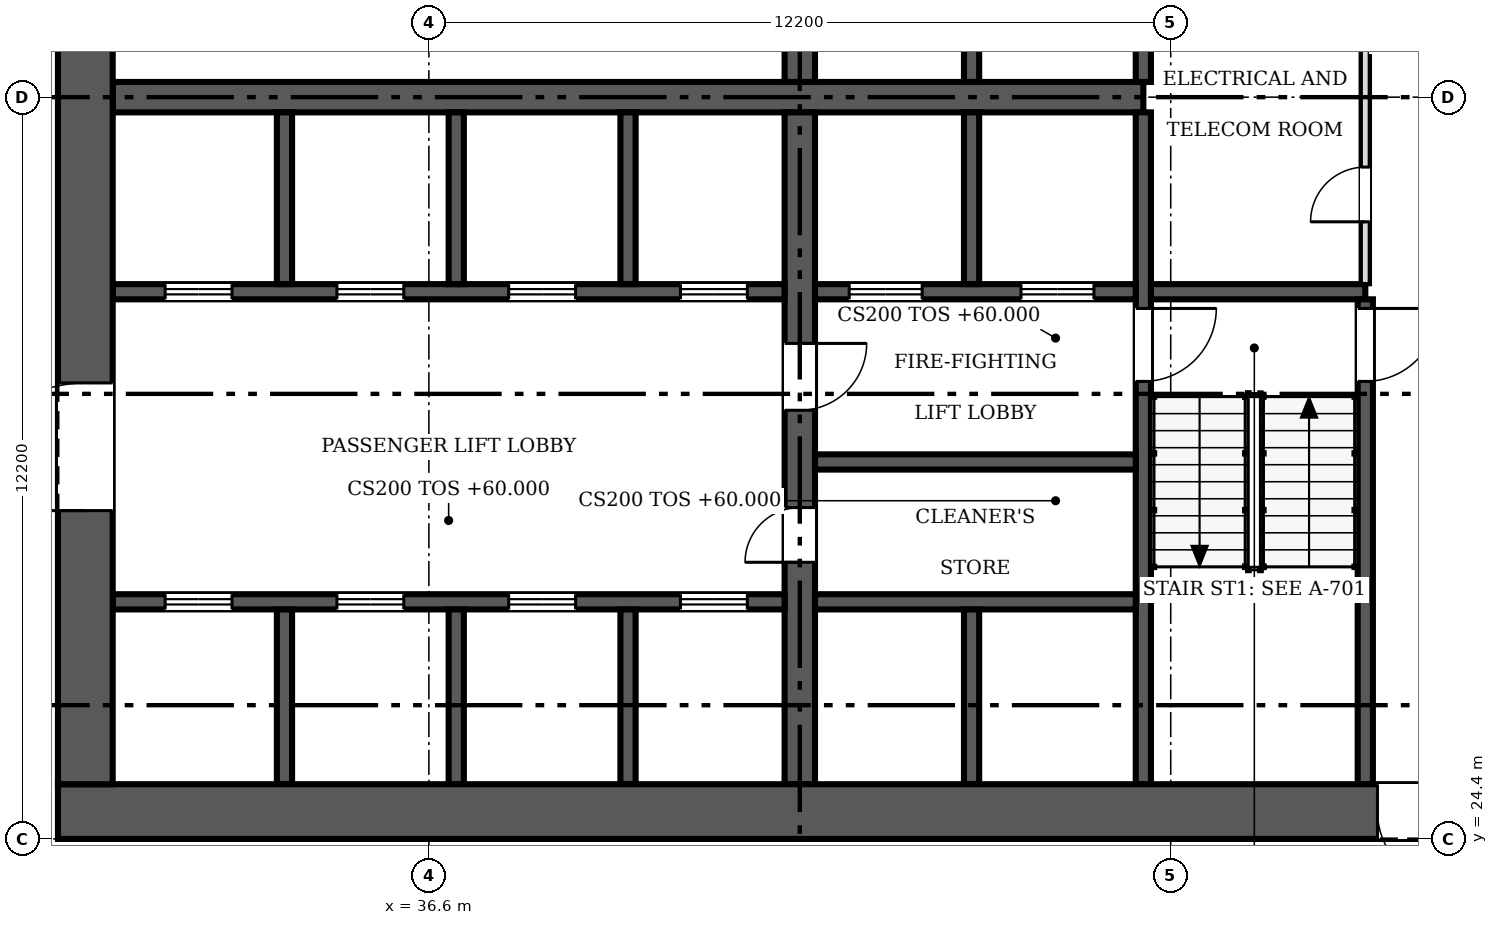
"""IFC4 building model, lengths in metres.
Left out: names, types, materials, properties, quantities, classifications, styles, units other than length and angle.
Written with IfcOpenShell. Run it as: python <this file> out.ifc"""

import sys

from ifc_helpers import new_model, si_unit, direction, frame, frame_2d, origin, place, context, subcontext, project, spatial, rectangle, extrude, source, transform, mapped, element, fill, save


model = new_model("IFC4")
c1 = context("Model", 3, precision=1e-05, world=origin(), true_north=direction((0.0, 1.0)))
c2 = subcontext(c1, "Body", "Model", "MODEL_VIEW")
j1 = project(units=[si_unit("LENGTHUNIT", "METRE"), si_unit("PLANEANGLEUNIT", "RADIAN")], contexts=[c1])
p1 = place(None, origin())
s1 = spatial("IfcSite", under=j1, at=p1, CompositionType="ELEMENT")
p2 = place(p1, origin())
s2 = spatial("IfcBuilding", under=s1, at=p2, CompositionType="ELEMENT")
p3 = place(p2, frame((0.0, 0.0, 60.0)))
s3 = spatial("IfcBuildingStorey", under=s2, at=p3, CompositionType="ELEMENT", Elevation=60.0)
p4 = place(p3, frame((54.9, 24.85, 0.0), z_axis=(0.0, 0.0, 1.0), x_axis=(-1.0, 0.0, 0.0)))
e1 = element("IfcWall", 1, at=p4, inside=s3, PredefinedType="SHEAR", context=c2, shape_type="SweptSolid", body=[
    extrude(rectangle(XDim=24.4, YDim=0.9, at=frame_2d((12.2, 0.0))), origin(), (0.0, 0.0, 1.0), 3.8),
])
m1 = source(origin(), c2, "Body", "SweptSolid", [
    extrude(rectangle(XDim=1.2, YDim=2.1, at=frame_2d((0.6, 1.05))), frame((0.0, 0.46, 0.0), z_axis=(0.0, -1.0, 0.0), x_axis=(1.0, 0.0, 0.0)), (0.0, 0.0, 1.0), 0.92),
])
p5 = place(p4, frame((1.5, 0.0, 0.0)))
e2 = element("IfcOpeningElement", 2, at=p5, cuts=e1, PredefinedType="OPENING", context=c2, shape_type="MappedRepresentation", body=[
    mapped(m1, transform((0.0, 0.0, 0.0), scale=1.0)),
])
p6 = place(p3, frame((30.95, 25.3, 0.0), z_axis=(0.0, 0.0, 1.0), x_axis=(0.0, 1.0, 0.0)))
e3 = element("IfcWall", 3, at=p6, inside=s3, PredefinedType="SHEAR", context=c2, shape_type="SweptSolid", body=[
    extrude(rectangle(XDim=22.6, YDim=0.9, at=frame_2d((11.3, 0.0))), origin(), (0.0, 0.0, 1.0), 3.8),
])
m2 = source(origin(), c2, "Body", "SweptSolid", [
    extrude(rectangle(XDim=2.1, YDim=2.4, at=frame_2d((1.05, 1.2))), frame((0.0, 0.46, 0.0), z_axis=(0.0, -1.0, 0.0), x_axis=(1.0, 0.0, 0.0)), (0.0, 0.0, 1.0), 0.92),
])
p7 = place(p6, frame((4.5, 0.0, 0.0)))
e4 = element("IfcOpeningElement", 4, at=p7, cuts=e3, PredefinedType="OPENING", context=c2, shape_type="MappedRepresentation", body=[
    mapped(m2, transform((0.0, 0.0, 0.0), scale=1.0)),
])
p8 = place(p6, frame((16.0, 0.0, 0.0)))
e5 = element("IfcOpeningElement", 5, at=p8, cuts=e3, PredefinedType="OPENING", context=c2, shape_type="MappedRepresentation", body=[
    mapped(m2, transform((0.0, 0.0, 0.0), scale=1.0)),
])
p9 = place(p3, frame((31.4, 36.6, 0.0), z_axis=(0.0, 0.0, 1.0), x_axis=(1.0, 0.0, 0.0)))
e6 = element("IfcWall", 6, at=p9, inside=s3, PredefinedType="SHEAR", context=c2, shape_type="SweptSolid", body=[
    extrude(rectangle(XDim=16.95, YDim=0.5, at=frame_2d((8.475, 0.0))), origin(), (0.0, 0.0, 1.0), 3.8),
])
p10 = place(p3, frame((42.7, 36.35, 0.0), z_axis=(0.0, 0.0, 1.0), x_axis=(0.0, -1.0, 0.0)))
e7 = element("IfcWall", 7, at=p10, inside=s3, PredefinedType="SHEAR", context=c2, shape_type="SweptSolid", body=[
    extrude(rectangle(XDim=11.05, YDim=0.5, at=frame_2d((5.525, 0.0))), origin(), (0.0, 0.0, 1.0), 3.8),
])
m3 = source(origin(), c2, "Body", "SweptSolid", [
    extrude(rectangle(XDim=0.9, YDim=2.1, at=frame_2d((0.45, 1.05))), frame((0.0, 0.26, 0.0), z_axis=(0.0, -1.0, 0.0), x_axis=(1.0, 0.0, 0.0)), (0.0, 0.0, 1.0), 0.52),
])
p11 = place(p10, frame((6.5, 0.0, 0.0)))
e8 = element("IfcOpeningElement", 8, at=p11, cuts=e7, PredefinedType="OPENING", context=c2, shape_type="MappedRepresentation", body=[
    mapped(m3, transform((0.0, 0.0, 0.0), scale=1.0)),
])
m4 = source(origin(), c2, "Body", "SweptSolid", [
    extrude(rectangle(XDim=1.1, YDim=2.1, at=frame_2d((0.55, 1.05))), frame((0.0, 0.26, 0.0), z_axis=(0.0, -1.0, 0.0), x_axis=(1.0, 0.0, 0.0)), (0.0, 0.0, 1.0), 0.52),
])
p12 = place(p10, frame((3.8, 0.0, 0.0)))
e9 = element("IfcOpeningElement", 9, at=p12, cuts=e7, PredefinedType="OPENING", context=c2, shape_type="MappedRepresentation", body=[
    mapped(m4, transform((0.0, 0.0, 0.0), scale=1.0)),
])
p13 = place(p3, frame((42.7, 36.85, 0.0), z_axis=(0.0, 0.0, 1.0), x_axis=(0.0, 1.0, 0.0)))
e10 = element("IfcWall", 10, at=p13, inside=s3, PredefinedType="SHEAR", context=c2, shape_type="SweptSolid", body=[
    extrude(rectangle(XDim=2.95, YDim=0.5, at=frame_2d((1.475, 0.0))), origin(), (0.0, 0.0, 1.0), 3.8),
])
p14 = place(p3, frame((48.35, 36.35, 0.0), z_axis=(0.0, 0.0, 1.0), x_axis=(0.0, -1.0, 0.0)))
e11 = element("IfcWall", 11, at=p14, inside=s3, PredefinedType="SOLIDWALL", context=c2, shape_type="SweptSolid", body=[
    extrude(rectangle(XDim=11.05, YDim=0.25, at=frame_2d((5.525, 0.0))), origin(), (0.0, 0.0, 1.0), 3.8),
])
m5 = source(origin(), c2, "Body", "SweptSolid", [
    extrude(rectangle(XDim=1.2, YDim=2.1, at=frame_2d((0.6, 1.05))), frame((0.0, 0.135, 0.0), z_axis=(0.0, -1.0, 0.0), x_axis=(1.0, 0.0, 0.0)), (0.0, 0.0, 1.0), 0.27),
])
p15 = place(p14, frame((3.225, 0.0, 0.0)))
e12 = element("IfcOpeningElement", 12, at=p15, cuts=e11, PredefinedType="OPENING", context=c2, shape_type="MappedRepresentation", body=[
    mapped(m5, transform((0.0, 0.0, 0.0), scale=1.0)),
])
p16 = place(p3, frame((48.35, 47.9, 0.0), z_axis=(0.0, 0.0, 1.0), x_axis=(0.0, -1.0, 0.0)))
e13 = element("IfcWall", 13, at=p16, inside=s3, PredefinedType="SOLIDWALL", context=c2, shape_type="SweptSolid", body=[
    extrude(rectangle(XDim=11.05, YDim=0.25, at=frame_2d((5.525, 0.0))), origin(), (0.0, 0.0, 1.0), 3.8),
])
p17 = place(p16, frame((6.625, 0.0, 0.0)))
e14 = element("IfcOpeningElement", 14, at=p17, cuts=e13, PredefinedType="OPENING", context=c2, shape_type="MappedRepresentation", body=[
    mapped(m5, transform((0.0, 0.0, 0.0), scale=1.0)),
])
p18 = place(p3, frame((42.45, 33.4, 0.0), z_axis=(0.0, 0.0, 1.0), x_axis=(-1.0, 0.0, 0.0)))
e15 = element("IfcWall", 15, at=p18, inside=s3, PredefinedType="SOLIDWALL", context=c2, shape_type="SweptSolid", body=[
    extrude(rectangle(XDim=11.05, YDim=0.25, at=frame_2d((5.525, 0.0))), origin(), (0.0, 0.0, 1.0), 3.8),
])
m6 = source(origin(), c2, "Body", "SweptSolid", [
    extrude(rectangle(XDim=1.1, YDim=2.1, at=frame_2d((0.55, 1.05))), frame((0.0, 0.135, 0.0), z_axis=(0.0, -1.0, 0.0), x_axis=(1.0, 0.0, 0.0)), (0.0, 0.0, 1.0), 0.27),
])
p19 = place(p18, frame((9.087, 0.0, 0.0)))
e16 = element("IfcOpeningElement", 16, at=p19, cuts=e15, PredefinedType="OPENING", context=c2, shape_type="MappedRepresentation", body=[
    mapped(m6, transform((0.0, 0.0, 0.0), scale=1.0)),
])
p20 = place(p18, frame((6.262, 0.0, 0.0)))
e17 = element("IfcOpeningElement", 17, at=p20, cuts=e15, PredefinedType="OPENING", context=c2, shape_type="MappedRepresentation", body=[
    mapped(m6, transform((0.0, 0.0, 0.0), scale=1.0)),
])
p21 = place(p18, frame((3.438, 0.0, 0.0)))
e18 = element("IfcOpeningElement", 18, at=p21, cuts=e15, PredefinedType="OPENING", context=c2, shape_type="MappedRepresentation", body=[
    mapped(m6, transform((0.0, 0.0, 0.0), scale=1.0)),
])
p22 = place(p18, frame((0.613, 0.0, 0.0)))
e19 = element("IfcOpeningElement", 19, at=p22, cuts=e15, PredefinedType="OPENING", context=c2, shape_type="MappedRepresentation", body=[
    mapped(m6, transform((0.0, 0.0, 0.0), scale=1.0)),
])
p23 = place(p3, frame((48.225, 33.4, 0.0), z_axis=(0.0, 0.0, 1.0), x_axis=(-1.0, 0.0, 0.0)))
e20 = element("IfcWall", 20, at=p23, inside=s3, PredefinedType="SOLIDWALL", context=c2, shape_type="SweptSolid", body=[
    extrude(rectangle(XDim=5.275, YDim=0.25, at=frame_2d((2.638, 0.0))), origin(), (0.0, 0.0, 1.0), 3.8),
])
p24 = place(p23, frame((3.512, 0.0, 0.0)))
e21 = element("IfcOpeningElement", 21, at=p24, cuts=e20, PredefinedType="OPENING", context=c2, shape_type="MappedRepresentation", body=[
    mapped(m5, transform((0.0, 0.0, 0.0), scale=1.0)),
])
p25 = place(p23, frame((0.688, 0.0, 0.0)))
e22 = element("IfcOpeningElement", 22, at=p25, cuts=e20, PredefinedType="OPENING", context=c2, shape_type="MappedRepresentation", body=[
    mapped(m5, transform((0.0, 0.0, 0.0), scale=1.0)),
])
p26 = place(p3, frame((48.475, 33.4, 0.0), z_axis=(0.0, 0.0, 1.0), x_axis=(1.0, 0.0, 0.0)))
e23 = element("IfcWall", 23, at=p26, inside=s3, PredefinedType="SOLIDWALL", context=c2, shape_type="SweptSolid", body=[
    extrude(rectangle(XDim=3.525, YDim=0.25, at=frame_2d((1.762, 0.0))), origin(), (0.0, 0.0, 1.0), 3.8),
])
p27 = place(p3, frame((31.4, 28.3, 0.0), z_axis=(0.0, 0.0, 1.0), x_axis=(1.0, 0.0, 0.0)))
e24 = element("IfcWall", 24, at=p27, inside=s3, PredefinedType="SOLIDWALL", context=c2, shape_type="SweptSolid", body=[
    extrude(rectangle(XDim=11.05, YDim=0.25, at=frame_2d((5.525, 0.0))), origin(), (0.0, 0.0, 1.0), 3.8),
])
p28 = place(p27, frame((0.863, 0.0, 0.0)))
e25 = element("IfcOpeningElement", 25, at=p28, cuts=e24, PredefinedType="OPENING", context=c2, shape_type="MappedRepresentation", body=[
    mapped(m6, transform((0.0, 0.0, 0.0), scale=1.0)),
])
p29 = place(p27, frame((3.688, 0.0, 0.0)))
e26 = element("IfcOpeningElement", 26, at=p29, cuts=e24, PredefinedType="OPENING", context=c2, shape_type="MappedRepresentation", body=[
    mapped(m6, transform((0.0, 0.0, 0.0), scale=1.0)),
])
p30 = place(p27, frame((6.512, 0.0, 0.0)))
e27 = element("IfcOpeningElement", 27, at=p30, cuts=e24, PredefinedType="OPENING", context=c2, shape_type="MappedRepresentation", body=[
    mapped(m6, transform((0.0, 0.0, 0.0), scale=1.0)),
])
p31 = place(p27, frame((9.337, 0.0, 0.0)))
e28 = element("IfcOpeningElement", 28, at=p31, cuts=e24, PredefinedType="OPENING", context=c2, shape_type="MappedRepresentation", body=[
    mapped(m6, transform((0.0, 0.0, 0.0), scale=1.0)),
])
p32 = place(p3, frame((42.95, 28.3, 0.0), z_axis=(0.0, 0.0, 1.0), x_axis=(1.0, 0.0, 0.0)))
e29 = element("IfcWall", 29, at=p32, inside=s3, PredefinedType="SOLIDWALL", context=c2, shape_type="SweptSolid", body=[
    extrude(rectangle(XDim=5.275, YDim=0.25, at=frame_2d((2.638, 0.0))), origin(), (0.0, 0.0, 1.0), 3.8),
])
p33 = place(p3, frame((52.0, 25.3, 0.0), z_axis=(0.0, 0.0, 1.0), x_axis=(0.0, 1.0, 0.0)))
e30 = element("IfcWall", 30, at=p33, inside=s3, PredefinedType="SOLIDWALL", context=c2, shape_type="SweptSolid", body=[
    extrude(rectangle(XDim=7.975, YDim=0.25, at=frame_2d((3.987, 0.0))), origin(), (0.0, 0.0, 1.0), 3.8),
])
p34 = place(p33, frame((6.625, 0.0, 0.0)))
e31 = element("IfcOpeningElement", 31, at=p34, cuts=e30, PredefinedType="OPENING", context=c2, shape_type="MappedRepresentation", body=[
    mapped(m5, transform((0.0, 0.0, 0.0), scale=1.0)),
])
p35 = place(p3, frame((45.525, 33.525, 0.0), z_axis=(0.0, 0.0, 1.0), x_axis=(0.0, 1.0, 0.0)))
e32 = element("IfcWall", 32, at=p35, inside=s3, PredefinedType="SOLIDWALL", context=c2, shape_type="SweptSolid", body=[
    extrude(rectangle(XDim=2.825, YDim=0.25, at=frame_2d((1.413, 0.0))), origin(), (0.0, 0.0, 1.0), 3.8),
])
p36 = place(p3, frame((45.525, 36.85, 0.0), z_axis=(0.0, 0.0, 1.0), x_axis=(0.0, 1.0, 0.0)))
e33 = element("IfcWall", 33, at=p36, inside=s3, PredefinedType="SOLIDWALL", context=c2, shape_type="SweptSolid", body=[
    extrude(rectangle(XDim=2.825, YDim=0.25, at=frame_2d((1.413, 0.0))), origin(), (0.0, 0.0, 1.0), 3.8),
])
p37 = place(p3, frame((42.95, 30.6, 0.0), z_axis=(0.0, 0.0, 1.0), x_axis=(1.0, 0.0, 0.0)))
e34 = element("IfcWall", 34, at=p37, inside=s3, PredefinedType="SOLIDWALL", context=c2, shape_type="SweptSolid", body=[
    extrude(rectangle(XDim=5.275, YDim=0.25, at=frame_2d((2.638, 0.0))), origin(), (0.0, 0.0, 1.0), 3.8),
])
for number, where, z_axis, x_axis in (
    (35, (34.225, 33.525, 0.0), (0.0, 0.0, 1.0), (0.0, 1.0, 0.0)),
    (36, (37.05, 33.525, 0.0), (0.0, 0.0, 1.0), (0.0, 1.0, 0.0)),
    (37, (39.875, 33.525, 0.0), (0.0, 0.0, 1.0), (0.0, 1.0, 0.0)),
):
    element("IfcWall", number, at=place(p3, frame(where, z_axis=z_axis, x_axis=x_axis)), inside=s3, PredefinedType="SOLIDWALL", context=c2, shape_type="SweptSolid", body=[
        extrude(rectangle(XDim=2.825, YDim=0.25, at=frame_2d((1.413, 0.0))), origin(), (0.0, 0.0, 1.0), 3.8),
    ])
for number, where, z_axis, x_axis in (
    (38, (34.225, 25.3, 0.0), (0.0, 0.0, 1.0), (0.0, 1.0, 0.0)),
    (39, (37.05, 25.3, 0.0), (0.0, 0.0, 1.0), (0.0, 1.0, 0.0)),
    (40, (39.875, 25.3, 0.0), (0.0, 0.0, 1.0), (0.0, 1.0, 0.0)),
    (41, (45.525, 25.3, 0.0), (0.0, 0.0, 1.0), (0.0, 1.0, 0.0)),
):
    element("IfcWall", number, at=place(p3, frame(where, z_axis=z_axis, x_axis=x_axis)), inside=s3, PredefinedType="SOLIDWALL", context=c2, shape_type="SweptSolid", body=[
        extrude(rectangle(XDim=2.875, YDim=0.25, at=frame_2d((1.438, 0.0))), origin(), (0.0, 0.0, 1.0), 3.8),
    ])
p38 = place(p3, frame((52.0, 33.525, 0.0), z_axis=(0.0, 0.0, 1.0), x_axis=(0.0, 1.0, 0.0)))
e42 = element("IfcWall", 42, at=p38, inside=s3, PredefinedType="PARTITIONING", context=c2, shape_type="SweptSolid", body=[
    extrude(rectangle(XDim=6.15, YDim=0.15, at=frame_2d((3.075, 0.0))), origin(), (0.0, 0.0, 1.0), 3.5),
])
m7 = source(origin(), c2, "Body", "SweptSolid", [
    extrude(rectangle(XDim=0.9, YDim=2.1, at=frame_2d((0.45, 1.05))), frame((0.0, 0.085, 0.0), z_axis=(0.0, -1.0, 0.0), x_axis=(1.0, 0.0, 0.0)), (0.0, 0.0, 1.0), 0.17),
])
p39 = place(p38, frame((1.025, 0.0, 0.0)))
e43 = element("IfcOpeningElement", 43, at=p39, cuts=e42, PredefinedType="OPENING", context=c2, shape_type="MappedRepresentation", body=[
    mapped(m7, transform((0.0, 0.0, 0.0), scale=1.0)),
])
m8 = source(origin(), c2, "Body", "SweptSolid", [
    extrude(rectangle(XDim=1.2, YDim=2.1, at=frame_2d((0.6, 1.05))), frame((0.0, 0.025, 0.0), z_axis=(0.0, -1.0, 0.0), x_axis=(1.0, 0.0, 0.0)), (0.0, 0.0, 1.0), 0.05),
])
p40 = place(p5, origin())
e44 = element("IfcDoor", 44, at=p40, inside=s3, OperationType="SINGLE_SWING_LEFT", PredefinedType="DOOR", context=c2, shape_type="MappedRepresentation", body=[
    mapped(m8, transform((0.0, 0.0, 0.0), scale=1.0)),
])
fill(e2, e44)
m9 = source(origin(), c2, "Body", "SweptSolid", [
    extrude(rectangle(XDim=2.1, YDim=2.4, at=frame_2d((1.05, 1.2))), frame((0.0, 0.025, 0.0), z_axis=(0.0, -1.0, 0.0), x_axis=(1.0, 0.0, 0.0)), (0.0, 0.0, 1.0), 0.05),
])
p41 = place(p7, origin())
e45 = element("IfcDoor", 45, at=p41, inside=s3, OperationType="DOUBLE_DOOR_SINGLE_SWING", PredefinedType="DOOR", context=c2, shape_type="MappedRepresentation", body=[
    mapped(m9, transform((0.0, 0.0, 0.0), scale=1.0)),
])
fill(e4, e45)
m10 = source(origin(), c2, "Body", "SweptSolid", [
    extrude(rectangle(XDim=0.9, YDim=2.1, at=frame_2d((0.45, 1.05))), frame((0.0, 0.025, 0.0), z_axis=(0.0, -1.0, 0.0), x_axis=(1.0, 0.0, 0.0)), (0.0, 0.0, 1.0), 0.05),
])
p42 = place(p11, origin())
e46 = element("IfcDoor", 46, at=p42, inside=s3, OperationType="SINGLE_SWING_RIGHT", PredefinedType="DOOR", context=c2, shape_type="MappedRepresentation", body=[
    mapped(m10, transform((0.0, 0.0, 0.0), scale=1.0)),
])
fill(e8, e46)
m11 = source(origin(), c2, "Body", "SweptSolid", [
    extrude(rectangle(XDim=1.1, YDim=2.1, at=frame_2d((0.55, 1.05))), frame((0.0, 0.025, 0.0), z_axis=(0.0, -1.0, 0.0), x_axis=(1.0, 0.0, 0.0)), (0.0, 0.0, 1.0), 0.05),
])
p43 = place(p12, origin())
e47 = element("IfcDoor", 47, at=p43, inside=s3, OperationType="SINGLE_SWING_LEFT", PredefinedType="DOOR", context=c2, shape_type="MappedRepresentation", body=[
    mapped(m11, transform((0.0, 0.0, 0.0), scale=1.0)),
])
fill(e9, e47)
p44 = place(p15, origin())
e48 = element("IfcDoor", 48, at=p44, inside=s3, OperationType="SINGLE_SWING_LEFT", PredefinedType="DOOR", context=c2, shape_type="MappedRepresentation", body=[
    mapped(m8, transform((0.0, 0.0, 0.0), scale=1.0)),
])
fill(e12, e48)
p45 = place(p19, origin())
e49 = element("IfcDoor", 49, at=p45, inside=s3, OperationType="DOUBLE_DOOR_SLIDING", PredefinedType="DOOR", context=c2, shape_type="MappedRepresentation", body=[
    mapped(m11, transform((0.0, 0.0, 0.0), scale=1.0)),
])
fill(e16, e49)
p46 = place(p20, origin())
e50 = element("IfcDoor", 50, at=p46, inside=s3, OperationType="DOUBLE_DOOR_SLIDING", PredefinedType="DOOR", context=c2, shape_type="MappedRepresentation", body=[
    mapped(m11, transform((0.0, 0.0, 0.0), scale=1.0)),
])
fill(e17, e50)
p47 = place(p21, origin())
e51 = element("IfcDoor", 51, at=p47, inside=s3, OperationType="DOUBLE_DOOR_SLIDING", PredefinedType="DOOR", context=c2, shape_type="MappedRepresentation", body=[
    mapped(m11, transform((0.0, 0.0, 0.0), scale=1.0)),
])
fill(e18, e51)
p48 = place(p22, origin())
e52 = element("IfcDoor", 52, at=p48, inside=s3, OperationType="DOUBLE_DOOR_SLIDING", PredefinedType="DOOR", context=c2, shape_type="MappedRepresentation", body=[
    mapped(m11, transform((0.0, 0.0, 0.0), scale=1.0)),
])
fill(e19, e52)
p49 = place(p24, origin())
e53 = element("IfcDoor", 53, at=p49, inside=s3, OperationType="DOUBLE_DOOR_SLIDING", PredefinedType="DOOR", context=c2, shape_type="MappedRepresentation", body=[
    mapped(m8, transform((0.0, 0.0, 0.0), scale=1.0)),
])
fill(e21, e53)
p50 = place(p25, origin())
e54 = element("IfcDoor", 54, at=p50, inside=s3, OperationType="DOUBLE_DOOR_SLIDING", PredefinedType="DOOR", context=c2, shape_type="MappedRepresentation", body=[
    mapped(m8, transform((0.0, 0.0, 0.0), scale=1.0)),
])
fill(e22, e54)
p51 = place(p28, origin())
e55 = element("IfcDoor", 55, at=p51, inside=s3, OperationType="DOUBLE_DOOR_SLIDING", PredefinedType="DOOR", context=c2, shape_type="MappedRepresentation", body=[
    mapped(m11, transform((0.0, 0.0, 0.0), scale=1.0)),
])
fill(e25, e55)
p52 = place(p29, origin())
e56 = element("IfcDoor", 56, at=p52, inside=s3, OperationType="DOUBLE_DOOR_SLIDING", PredefinedType="DOOR", context=c2, shape_type="MappedRepresentation", body=[
    mapped(m11, transform((0.0, 0.0, 0.0), scale=1.0)),
])
fill(e26, e56)
p53 = place(p30, origin())
e57 = element("IfcDoor", 57, at=p53, inside=s3, OperationType="DOUBLE_DOOR_SLIDING", PredefinedType="DOOR", context=c2, shape_type="MappedRepresentation", body=[
    mapped(m11, transform((0.0, 0.0, 0.0), scale=1.0)),
])
fill(e27, e57)
p54 = place(p31, origin())
e58 = element("IfcDoor", 58, at=p54, inside=s3, OperationType="DOUBLE_DOOR_SLIDING", PredefinedType="DOOR", context=c2, shape_type="MappedRepresentation", body=[
    mapped(m11, transform((0.0, 0.0, 0.0), scale=1.0)),
])
fill(e28, e58)
p55 = place(p34, origin())
e59 = element("IfcDoor", 59, at=p55, inside=s3, OperationType="SINGLE_SWING_RIGHT", PredefinedType="DOOR", context=c2, shape_type="MappedRepresentation", body=[
    mapped(m8, transform((0.0, 0.0, 0.0), scale=1.0)),
])
fill(e31, e59)
p56 = place(p39, origin())
e60 = element("IfcDoor", 60, at=p56, inside=s3, OperationType="SINGLE_SWING_LEFT", PredefinedType="DOOR", context=c2, shape_type="MappedRepresentation", body=[
    mapped(m10, transform((0.0, 0.0, 0.0), scale=1.0)),
])
fill(e43, e60)
save(model, sys.argv[1])
